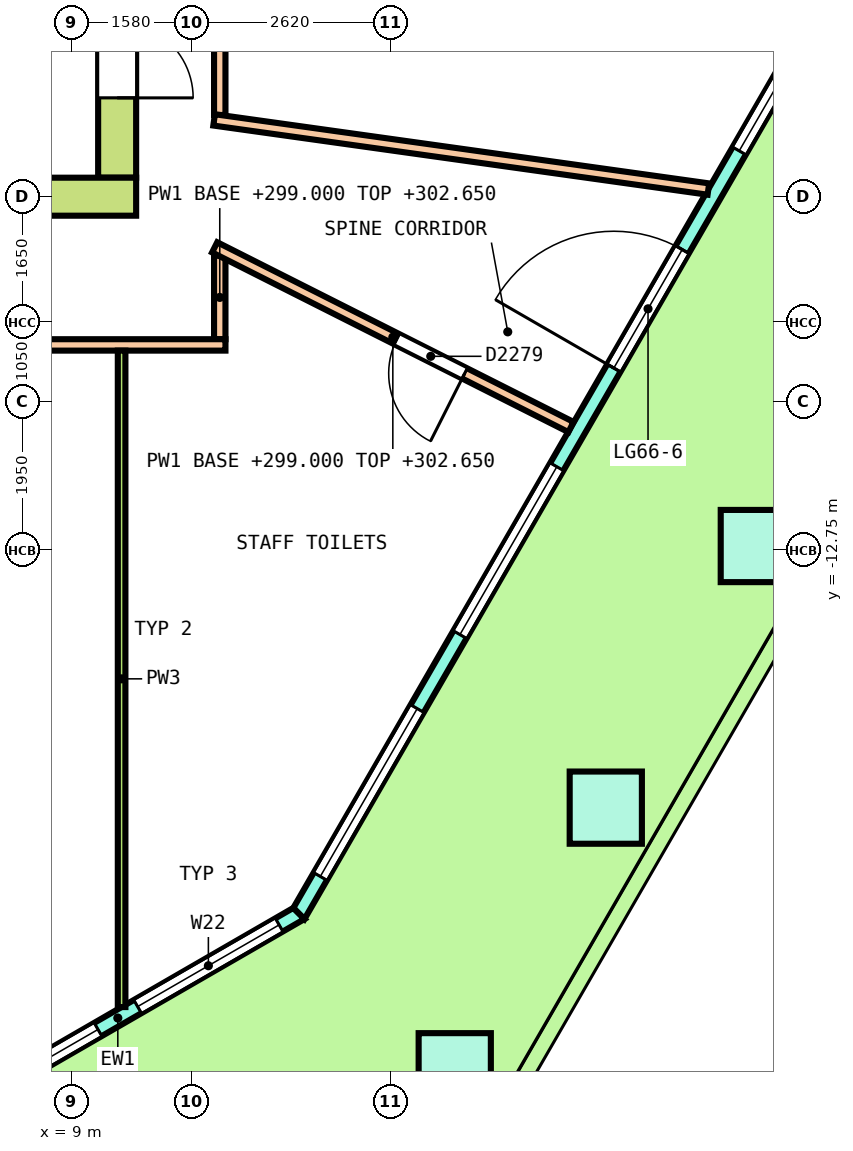
"""IFC4 building model, lengths in metres.
Left out: names, types, materials, properties, quantities, classifications, styles, units other than length and angle.
Written with IfcOpenShell. Run it as: python <this file> out.ifc"""

import sys

from ifc_helpers import new_model, si_unit, direction, frame, frame_2d, origin, origin_2d, place, context, subcontext, project, spatial, polyline, rectangle, outline, extrude, element, fill, save


model = new_model("IFC4")
c1 = context("Model", 3, precision=1e-05, world=origin(), true_north=direction((0.0, 1.0)))
c2 = subcontext(c1, "Body", "Model", "MODEL_VIEW")
j1 = project(units=[si_unit("LENGTHUNIT", "METRE"), si_unit("PLANEANGLEUNIT", "RADIAN")], contexts=[c1])
p1 = place(None, origin())
s1 = spatial("IfcSite", under=j1, at=p1, CompositionType="ELEMENT")
p2 = place(p1, origin())
s2 = spatial("IfcBuilding", under=s1, at=p2, CompositionType="ELEMENT")
p3 = place(p2, frame((0.0, 0.0, 299.0)))
s3 = spatial("IfcBuildingStorey", under=s2, at=p3, CompositionType="ELEMENT", Elevation=299.0)
p4 = place(p3, frame((14.042, -19.579, 0.0), z_axis=(0.155252897451, 0.268871239651, 0.950581292853), x_axis=(0.475345673874, 0.823195775415, -0.310475773077)))
e1 = element("IfcColumn", 1, at=p4, inside=s3, PredefinedType="COLUMN", context=c2, shape_type="SweptSolid", body=[
    extrude(rectangle(XDim=0.95, YDim=0.95, at=origin_2d()), origin(), (0.0, 0.0, 1.0), 3.829),
])
p5 = place(p3, frame((16.029, -16.138, 0.0), z_axis=(0.096165528476, 0.166528943905, 0.981335978131), x_axis=(0.490749060083, 0.849815075181, -0.192301060902)))
e2 = element("IfcColumn", 2, at=p5, inside=s3, PredefinedType="COLUMN", context=c2, shape_type="SweptSolid", body=[
    extrude(rectangle(XDim=0.95, YDim=0.95, at=origin_2d()), origin(), (0.0, 0.0, 1.0), 3.709),
])
p6 = place(p3, frame((18.016, -12.696, 0.0), z_axis=(0.032595412113, 0.056422859161, 0.997874741675), x_axis=(0.499318800947, 0.863964545124, -0.065161336616)))
e3 = element("IfcColumn", 3, at=p6, inside=s3, PredefinedType="COLUMN", context=c2, shape_type="SweptSolid", body=[
    extrude(rectangle(XDim=0.95, YDim=0.95, at=origin_2d()), origin(), (0.0, 0.0, 1.0), 3.648),
])
p7 = place(p3, frame((7.226, -20.281, 0.0), z_axis=(0.0, 0.0, 1.0), x_axis=(0.866026017613, 0.499998936816, 0.0)))
e4 = element("IfcWall", 4, at=p7, inside=s3, PredefinedType="SOLIDWALL", context=c2, shape_type="SweptSolid", body=[
    extrude(outline(polyline([(-0.027, -0.1), (1.084, -0.1), (2.196, -0.1), (3.307, -0.1), (4.419, -0.1), (5.53, -0.1), (5.477, 0.1), (4.387, 0.1), (3.297, 0.1), (2.207, 0.1), (1.117, 0.1), (0.027, 0.1), (-0.027, -0.1)])), origin(), (0.0, 0.0, 1.0), 3.7),
])
p8 = place(p7, frame((0.301, 0.0, 0.1)))
e5 = element("IfcOpeningElement", 5, at=p8, cuts=e4, PredefinedType="OPENING", context=c2, shape_type="SweptSolid", body=[
    extrude(rectangle(XDim=2.15, YDim=2.75, at=frame_2d((1.075, 1.375))), frame((0.0, 0.11, 0.0), z_axis=(0.0, -1.0, 0.0), x_axis=(1.0, 0.0, 0.0)), (0.0, 0.0, 1.0), 0.22),
])
p9 = place(p7, frame((3.052, 0.0, 0.1)))
e6 = element("IfcOpeningElement", 6, at=p9, cuts=e4, PredefinedType="OPENING", context=c2, shape_type="SweptSolid", body=[
    extrude(rectangle(XDim=2.15, YDim=2.75, at=frame_2d((1.075, 1.375))), frame((0.0, 0.11, 0.0), z_axis=(0.0, -1.0, 0.0), x_axis=(1.0, 0.0, 0.0)), (0.0, 0.0, 1.0), 0.22),
])
p10 = place(p3, frame((11.992, -17.53, 0.0), z_axis=(0.0, 0.0, 1.0), x_axis=(0.50000545275, 0.866022255615, 0.0)))
e7 = element("IfcWall", 7, at=p10, inside=s3, PredefinedType="SOLIDWALL", context=c2, shape_type="SweptSolid", body=[
    extrude(outline(polyline([(-0.027, -0.1), (0.997, -0.1), (2.02, -0.1), (3.044, -0.1), (4.067, -0.1), (5.091, -0.1), (6.115, -0.1), (7.138, -0.1), (8.162, -0.1), (9.185, -0.1), (10.209, -0.1), (11.232, -0.1), (12.256, -0.1), (13.279, -0.1), (14.303, -0.1), (15.327, -0.1), (16.35, -0.1), (17.374, -0.1), (18.397, -0.1), (18.344, 0.1), (17.326, 0.1), (16.308, 0.1), (15.291, 0.1), (14.273, 0.1), (13.256, 0.1), (12.238, 0.1), (11.22, 0.1), (10.203, 0.1), (9.185, 0.1), (8.167, 0.1), (7.15, 0.1), (6.132, 0.1), (5.115, 0.1), (4.097, 0.1), (3.08, 0.1), (2.062, 0.1), (1.044, 0.1), (0.027, 0.1), (-0.027, -0.1)])), origin(), (0.0, 0.0, 1.0), 3.7),
])
p11 = place(p10, frame((0.562, 0.0, 0.1)))
e8 = element("IfcOpeningElement", 8, at=p11, cuts=e7, PredefinedType="OPENING", context=c2, shape_type="SweptSolid", body=[
    extrude(rectangle(XDim=2.55, YDim=2.75, at=frame_2d((1.275, 1.375))), frame((0.0, 0.11, 0.0), z_axis=(0.0, -1.0, 0.0), x_axis=(1.0, 0.0, 0.0)), (0.0, 0.0, 1.0), 0.22),
])
p12 = place(p10, frame((4.236, 0.0, 0.1)))
e9 = element("IfcOpeningElement", 9, at=p12, cuts=e7, PredefinedType="OPENING", context=c2, shape_type="SweptSolid", body=[
    extrude(rectangle(XDim=2.55, YDim=2.75, at=frame_2d((1.275, 1.375))), frame((0.0, 0.11, 0.0), z_axis=(0.0, -1.0, 0.0), x_axis=(1.0, 0.0, 0.0)), (0.0, 0.0, 1.0), 0.22),
])
p13 = place(p10, frame((8.285, 0.0, 0.0)))
e10 = element("IfcOpeningElement", 10, at=p13, cuts=e7, PredefinedType="OPENING", context=c2, shape_type="SweptSolid", body=[
    extrude(rectangle(XDim=1.8, YDim=2.4, at=frame_2d((0.9, 1.2))), frame((0.0, 0.11, 0.0), z_axis=(0.0, -1.0, 0.0), x_axis=(1.0, 0.0, 0.0)), (0.0, 0.0, 1.0), 0.22),
])
p14 = place(p10, frame((8.285, 0.0, 2.55)))
e11 = element("IfcOpeningElement", 11, at=p14, cuts=e7, PredefinedType="OPENING", context=c2, shape_type="SweptSolid", body=[
    extrude(rectangle(XDim=1.8, YDim=0.3, at=frame_2d((0.9, 0.15))), frame((0.0, 0.11, 0.0), z_axis=(0.0, -1.0, 0.0), x_axis=(1.0, 0.0, 0.0)), (0.0, 0.0, 1.0), 0.22),
])
p15 = place(p10, frame((11.584, 0.0, 0.1)))
e12 = element("IfcOpeningElement", 12, at=p15, cuts=e7, PredefinedType="OPENING", context=c2, shape_type="SweptSolid", body=[
    extrude(rectangle(XDim=2.55, YDim=2.75, at=frame_2d((1.275, 1.375))), frame((0.0, 0.11, 0.0), z_axis=(0.0, -1.0, 0.0), x_axis=(1.0, 0.0, 0.0)), (0.0, 0.0, 1.0), 0.22),
])
p16 = place(p10, frame((15.258, 0.0, 0.1)))
e13 = element("IfcOpeningElement", 13, at=p16, cuts=e7, PredefinedType="OPENING", context=c2, shape_type="SweptSolid", body=[
    extrude(rectangle(XDim=2.55, YDim=2.75, at=frame_2d((1.275, 1.375))), frame((0.0, 0.11, 0.0), z_axis=(0.0, -1.0, 0.0), x_axis=(1.0, 0.0, 0.0)), (0.0, 0.0, 1.0), 0.22),
])
p17 = place(p3, frame((-9.85, -8.1, 0.0), z_axis=(0.0, 0.0, 1.0), x_axis=(1.0, 0.0, 0.0)))
e14 = element("IfcWall", 14, at=p17, inside=s3, PredefinedType="SHEAR", context=c2, shape_type="SweptSolid", body=[
    extrude(rectangle(XDim=19.7, YDim=0.5, at=frame_2d((9.85, 0.0))), origin(), (0.0, 0.0, 1.0), 3.7),
])
p18 = place(p17, frame((11.4, 0.0, 0.0)))
e15 = element("IfcOpeningElement", 15, at=p18, cuts=e14, PredefinedType="OPENING", context=c2, shape_type="SweptSolid", body=[
    extrude(rectangle(XDim=1.2, YDim=2.1, at=frame_2d((0.6, 1.05))), frame((0.0, 0.26, 0.0), z_axis=(0.0, -1.0, 0.0), x_axis=(1.0, 0.0, 0.0)), (0.0, 0.0, 1.0), 0.52),
])
p19 = place(p3, frame((9.6, -7.85, 0.0), z_axis=(0.0, 0.0, 1.0), x_axis=(0.0, 1.0, 0.0)))
e16 = element("IfcWall", 16, at=p19, inside=s3, PredefinedType="SHEAR", context=c2, shape_type="SweptSolid", body=[
    extrude(rectangle(XDim=15.7, YDim=0.5, at=frame_2d((7.85, 0.0))), origin(), (0.0, 0.0, 1.0), 3.7),
])
p20 = place(p19, frame((6.65, 0.0, 0.0)))
e17 = element("IfcOpeningElement", 17, at=p20, cuts=e16, PredefinedType="OPENING", context=c2, shape_type="SweptSolid", body=[
    extrude(rectangle(XDim=2.4, YDim=2.1, at=frame_2d((1.2, 1.05))), frame((0.0, 0.26, 0.0), z_axis=(0.0, -1.0, 0.0), x_axis=(1.0, 0.0, 0.0)), (0.0, 0.0, 1.0), 0.52),
])
p21 = place(p19, frame((13.55, 0.0, 0.0)))
e18 = element("IfcOpeningElement", 18, at=p21, cuts=e16, PredefinedType="OPENING", context=c2, shape_type="SweptSolid", body=[
    extrude(rectangle(XDim=1.2, YDim=2.1, at=frame_2d((0.6, 1.05))), frame((0.0, 0.26, 0.0), z_axis=(0.0, -1.0, 0.0), x_axis=(1.0, 0.0, 0.0)), (0.0, 0.0, 1.0), 0.52),
])
p22 = place(p19, frame((1.05, 0.0, 0.0)))
e19 = element("IfcOpeningElement", 19, at=p22, cuts=e16, PredefinedType="OPENING", context=c2, shape_type="SweptSolid", body=[
    extrude(rectangle(XDim=1.0, YDim=2.1, at=frame_2d((0.5, 1.05))), frame((0.0, 0.26, 0.0), z_axis=(0.0, -1.0, 0.0), x_axis=(1.0, 0.0, 0.0)), (0.0, 0.0, 1.0), 0.52),
])
p23 = place(p3, frame((10.95, -9.975, 0.0), z_axis=(0.0, 0.0, 1.0), x_axis=(0.0, 1.0, 0.0)))
e20 = element("IfcWall", 20, at=p23, inside=s3, PredefinedType="PARTITIONING", context=c2, shape_type="SweptSolid", body=[
    extrude(rectangle(XDim=1.1, YDim=0.15, at=frame_2d((0.55, 0.0))), origin(), (0.0, 0.0, 1.0), 3.65),
])
p24 = place(p3, frame((10.95, -7.025, 0.0), z_axis=(0.0, 0.0, 1.0), x_axis=(0.0, 1.0, 0.0)))
e21 = element("IfcWall", 21, at=p24, inside=s3, PredefinedType="PARTITIONING", context=c2, shape_type="SweptSolid", body=[
    extrude(rectangle(XDim=17.0, YDim=0.15, at=frame_2d((8.5, 0.0))), origin(), (0.0, 0.0, 1.0), 2.9),
])
p25 = place(p24, frame((11.558, 0.0, 0.0)))
e22 = element("IfcOpeningElement", 22, at=p25, cuts=e21, PredefinedType="OPENING", context=c2, shape_type="SweptSolid", body=[
    extrude(rectangle(XDim=1.0, YDim=2.1, at=frame_2d((0.5, 1.05))), frame((0.0, 0.085, 0.0), z_axis=(0.0, -1.0, 0.0), x_axis=(1.0, 0.0, 0.0)), (0.0, 0.0, 1.0), 0.17),
])
p26 = place(p24, frame((4.521, 0.0, 0.0)))
e23 = element("IfcOpeningElement", 23, at=p26, cuts=e21, PredefinedType="OPENING", context=c2, shape_type="SweptSolid", body=[
    extrude(rectangle(XDim=1.0, YDim=2.1, at=frame_2d((0.5, 1.05))), frame((0.0, 0.085, 0.0), z_axis=(0.0, -1.0, 0.0), x_axis=(1.0, 0.0, 0.0)), (0.0, 0.0, 1.0), 0.17),
])
p27 = place(p3, frame((-10.9, -10.05, 0.0), z_axis=(0.0, 0.0, 1.0), x_axis=(1.0, 0.0, 0.0)))
e24 = element("IfcWall", 24, at=p27, inside=s3, PredefinedType="PARTITIONING", context=c2, shape_type="SweptSolid", body=[
    extrude(rectangle(XDim=21.925, YDim=0.15, at=frame_2d((10.962, 0.0))), origin(), (0.0, 0.0, 1.0), 2.9),
])
p28 = place(p27, frame((1.299, 0.0, 0.0)))
e25 = element("IfcOpeningElement", 25, at=p28, cuts=e24, PredefinedType="OPENING", context=c2, shape_type="SweptSolid", body=[
    extrude(rectangle(XDim=1.0, YDim=2.1, at=frame_2d((0.5, 1.05))), frame((0.0, 0.085, 0.0), z_axis=(0.0, -1.0, 0.0), x_axis=(1.0, 0.0, 0.0)), (0.0, 0.0, 1.0), 0.17),
])
p29 = place(p27, frame((6.924, 0.0, 0.0)))
e26 = element("IfcOpeningElement", 26, at=p29, cuts=e24, PredefinedType="OPENING", context=c2, shape_type="SweptSolid", body=[
    extrude(rectangle(XDim=1.2, YDim=2.1, at=frame_2d((0.6, 1.05))), frame((0.0, 0.085, 0.0), z_axis=(0.0, -1.0, 0.0), x_axis=(1.0, 0.0, 0.0)), (0.0, 0.0, 1.0), 0.17),
])
p30 = place(p27, frame((11.235, 0.0, 0.0)))
e27 = element("IfcOpeningElement", 27, at=p30, cuts=e24, PredefinedType="OPENING", context=c2, shape_type="SweptSolid", body=[
    extrude(rectangle(XDim=1.0, YDim=2.1, at=frame_2d((0.5, 1.05))), frame((0.0, 0.085, 0.0), z_axis=(0.0, -1.0, 0.0), x_axis=(1.0, 0.0, 0.0)), (0.0, 0.0, 1.0), 0.17),
])
p31 = place(p27, frame((18.157, 0.0, 0.0)))
e28 = element("IfcOpeningElement", 28, at=p31, cuts=e24, PredefinedType="OPENING", context=c2, shape_type="SweptSolid", body=[
    extrude(rectangle(XDim=1.2, YDim=2.1, at=frame_2d((0.6, 1.05))), frame((0.0, 0.085, 0.0), z_axis=(0.0, -1.0, 0.0), x_axis=(1.0, 0.0, 0.0)), (0.0, 0.0, 1.0), 0.17),
])
p32 = place(p3, frame((10.883, -8.766, 0.0), z_axis=(0.0, 0.0, 1.0), x_axis=(0.892868658508, -0.450317175615, 0.0)))
e29 = element("IfcWall", 29, at=p32, inside=s3, PredefinedType="PARTITIONING", context=c2, shape_type="SweptSolid", body=[
    extrude(rectangle(XDim=5.25, YDim=0.15, at=frame_2d((2.625, 0.0))), origin(), (0.0, 0.0, 1.0), 3.65),
])
p33 = place(p32, frame((2.684, 0.0, 0.0)))
e30 = element("IfcOpeningElement", 30, at=p33, cuts=e29, PredefinedType="OPENING", context=c2, shape_type="SweptSolid", body=[
    extrude(rectangle(XDim=1.0, YDim=2.1, at=frame_2d((0.5, 1.05))), frame((0.0, 0.085, 0.0), z_axis=(0.0, -1.0, 0.0), x_axis=(1.0, 0.0, 0.0)), (0.0, 0.0, 1.0), 0.17),
])
p34 = place(p3, frame((10.876, -7.09, 0.0), z_axis=(0.0, 0.0, 1.0), x_axis=(0.990351444624, -0.138578555814, 0.0)))
e31 = element("IfcWall", 31, at=p34, inside=s3, PredefinedType="PARTITIONING", context=c2, shape_type="SweptSolid", body=[
    extrude(rectangle(XDim=6.566, YDim=0.15, at=frame_2d((3.283, 0.0))), origin(), (0.0, 0.0, 1.0), 2.9),
])
p35 = place(p3, frame((9.659, -18.761, 0.0), z_axis=(0.0, 0.0, 1.0), x_axis=(0.0, 1.0, 0.0)))
e32 = element("IfcWall", 32, at=p35, inside=s3, PredefinedType="PARTITIONING", context=c2, shape_type="SweptSolid", body=[
    extrude(rectangle(XDim=8.636, YDim=0.1, at=frame_2d((4.318, 0.0))), origin(), (0.0, 0.0, 1.0), 2.9),
])
p36 = place(p8, origin())
e33 = element("IfcWindow", 33, at=p36, inside=s3, PartitioningType="SINGLE_PANEL", PredefinedType="WINDOW", context=c2, shape_type="SweptSolid", body=[
    extrude(rectangle(XDim=2.15, YDim=2.75, at=frame_2d((1.075, 1.375))), frame((0.0, 0.03, 0.0), z_axis=(0.0, -1.0, 0.0), x_axis=(1.0, 0.0, 0.0)), (0.0, 0.0, 1.0), 0.06),
])
fill(e5, e33)
p37 = place(p9, origin())
e34 = element("IfcWindow", 34, at=p37, inside=s3, PartitioningType="SINGLE_PANEL", PredefinedType="WINDOW", context=c2, shape_type="SweptSolid", body=[
    extrude(rectangle(XDim=2.15, YDim=2.75, at=frame_2d((1.075, 1.375))), frame((0.0, 0.03, 0.0), z_axis=(0.0, -1.0, 0.0), x_axis=(1.0, 0.0, 0.0)), (0.0, 0.0, 1.0), 0.06),
])
fill(e6, e34)
p38 = place(p11, origin())
e35 = element("IfcWindow", 35, at=p38, inside=s3, PartitioningType="SINGLE_PANEL", PredefinedType="WINDOW", context=c2, shape_type="SweptSolid", body=[
    extrude(rectangle(XDim=2.55, YDim=2.75, at=frame_2d((1.275, 1.375))), frame((0.0, 0.03, 0.0), z_axis=(0.0, -1.0, 0.0), x_axis=(1.0, 0.0, 0.0)), (0.0, 0.0, 1.0), 0.06),
])
fill(e8, e35)
p39 = place(p12, origin())
e36 = element("IfcWindow", 36, at=p39, inside=s3, PartitioningType="SINGLE_PANEL", PredefinedType="WINDOW", context=c2, shape_type="SweptSolid", body=[
    extrude(rectangle(XDim=2.55, YDim=2.75, at=frame_2d((1.275, 1.375))), frame((0.0, 0.03, 0.0), z_axis=(0.0, -1.0, 0.0), x_axis=(1.0, 0.0, 0.0)), (0.0, 0.0, 1.0), 0.06),
])
fill(e9, e36)
p40 = place(p13, origin())
e37 = element("IfcDoor", 37, at=p40, inside=s3, OperationType="DOUBLE_DOOR_SINGLE_SWING", PredefinedType="DOOR", context=c2, shape_type="SweptSolid", body=[
    extrude(rectangle(XDim=1.8, YDim=2.4, at=frame_2d((0.9, 1.2))), frame((0.0, 0.025, 0.0), z_axis=(0.0, -1.0, 0.0), x_axis=(1.0, 0.0, 0.0)), (0.0, 0.0, 1.0), 0.05),
])
fill(e10, e37)
p41 = place(p14, origin())
e38 = element("IfcWindow", 38, at=p41, inside=s3, PartitioningType="SINGLE_PANEL", PredefinedType="WINDOW", context=c2, shape_type="SweptSolid", body=[
    extrude(rectangle(XDim=1.8, YDim=0.3, at=frame_2d((0.9, 0.15))), frame((0.0, 0.03, 0.0), z_axis=(0.0, -1.0, 0.0), x_axis=(1.0, 0.0, 0.0)), (0.0, 0.0, 1.0), 0.06),
])
fill(e11, e38)
p42 = place(p15, origin())
e39 = element("IfcWindow", 39, at=p42, inside=s3, PartitioningType="SINGLE_PANEL", PredefinedType="WINDOW", context=c2, shape_type="SweptSolid", body=[
    extrude(rectangle(XDim=2.55, YDim=2.75, at=frame_2d((1.275, 1.375))), frame((0.0, 0.03, 0.0), z_axis=(0.0, -1.0, 0.0), x_axis=(1.0, 0.0, 0.0)), (0.0, 0.0, 1.0), 0.06),
])
fill(e12, e39)
p43 = place(p22, origin())
e40 = element("IfcDoor", 40, at=p43, inside=s3, OperationType="SINGLE_SWING_RIGHT", PredefinedType="DOOR", context=c2, shape_type="SweptSolid", body=[
    extrude(rectangle(XDim=1.0, YDim=2.1, at=frame_2d((0.5, 1.05))), frame((0.0, 0.2, 0.0), z_axis=(0.0, -1.0, 0.0), x_axis=(1.0, 0.0, 0.0)), (0.0, 0.0, 1.0), 0.4),
])
fill(e19, e40)
p44 = place(p33, origin())
e41 = element("IfcDoor", 41, at=p44, inside=s3, OperationType="SINGLE_SWING_LEFT", PredefinedType="DOOR", context=c2, shape_type="SweptSolid", body=[
    extrude(rectangle(XDim=1.0, YDim=2.1, at=frame_2d((0.5, 1.05))), frame((0.0, 0.025, 0.0), z_axis=(0.0, -1.0, 0.0), x_axis=(1.0, 0.0, 0.0)), (0.0, 0.0, 1.0), 0.05),
])
fill(e30, e41)
save(model, sys.argv[1])
